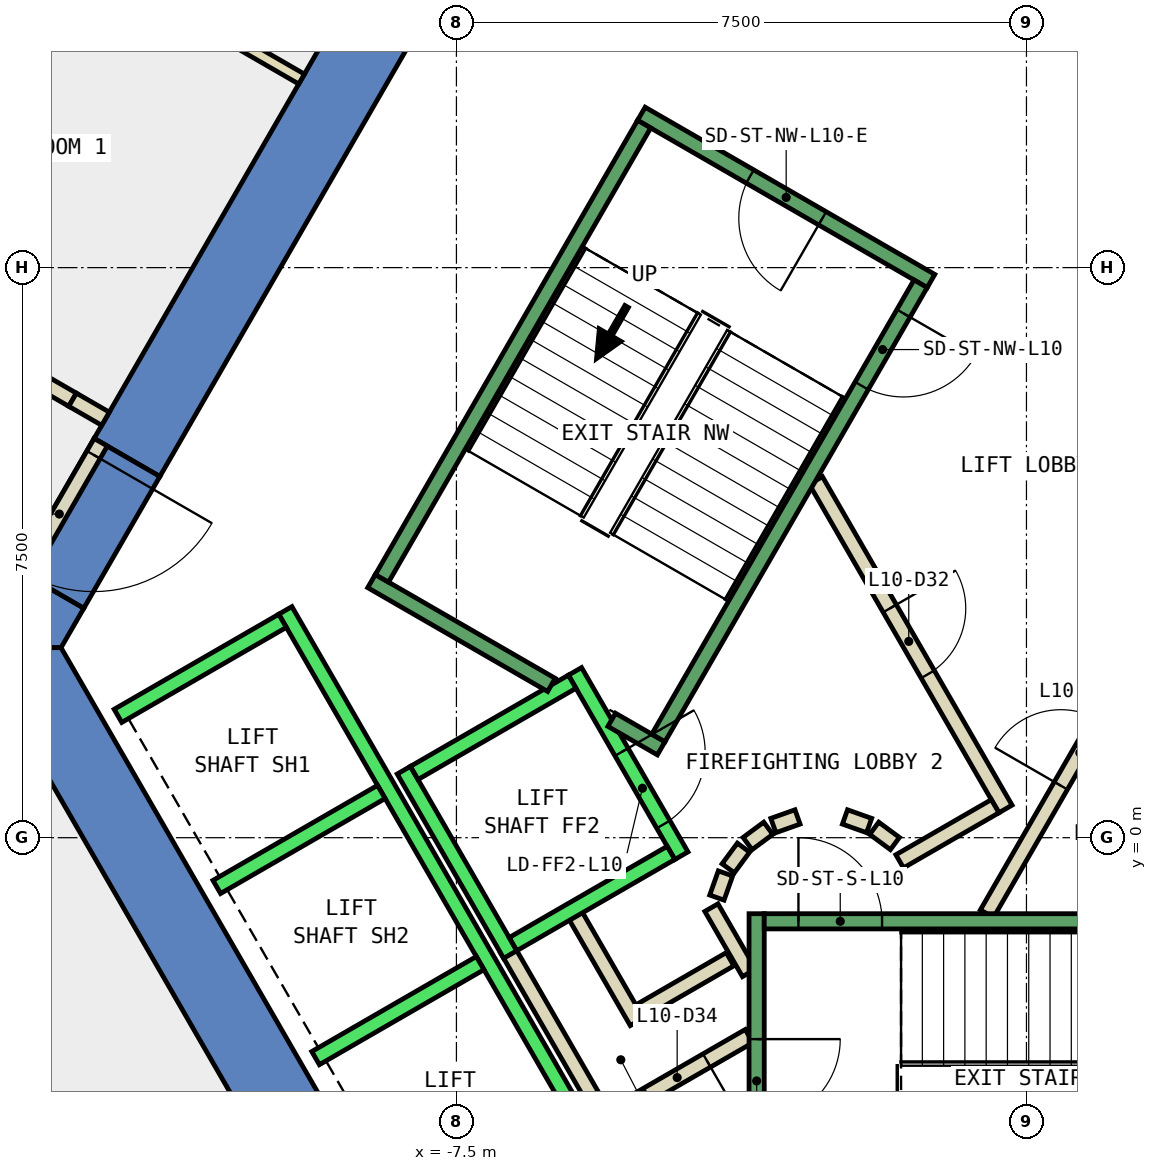
"""IFC4 building model, lengths in metres.
Left out: names, types, materials, properties, quantities, classifications, styles, units other than length and angle.
Written with IfcOpenShell. Run it as: python <this file> out.ifc"""

import sys

from ifc_helpers import new_model, si_unit, direction, frame, frame_2d, origin, place, context, subcontext, project, spatial, polyline, rectangle, outline, extrude, element, fill, save


model = new_model("IFC4")
c1 = context("Model", 3, precision=1e-05, world=origin(), true_north=direction((0.0, 1.0)))
c2 = subcontext(c1, "Body", "Model", "MODEL_VIEW")
j1 = project(units=[si_unit("LENGTHUNIT", "METRE"), si_unit("PLANEANGLEUNIT", "RADIAN")], contexts=[c1])
p1 = place(None, origin())
s1 = spatial("IfcSite", under=j1, at=p1, CompositionType="ELEMENT")
p2 = place(p1, origin())
s2 = spatial("IfcBuilding", under=s1, at=p2, CompositionType="ELEMENT")
p3 = place(p2, frame((0.0, 0.0, 51.8)))
s3 = spatial("IfcBuildingStorey", under=s2, at=p3, CompositionType="ELEMENT", Elevation=51.8)
p4 = place(p3, frame((0.0, 0.0, -0.4)))
e1 = element("IfcWall", 1, at=p4, inside=s3, PredefinedType="SHEAR", context=c2, shape_type="SweptSolid", body=[
    extrude(outline(polyline([(-12.267, 5.252), (-11.402, 4.752), (-6.351, 13.5), (-6.928, 14.5), (-12.267, 5.252)])), origin(), (0.0, 0.0, 1.0), 4.2),
])
p5 = place(p3, frame((0.0, 0.0, -0.4)))
e2 = element("IfcWall", 2, at=p5, inside=s3, PredefinedType="SHEAR", context=c2, shape_type="SweptSolid", body=[
    extrude(outline(polyline([(-12.402, 3.02), (-13.267, 3.52), (-13.856, 2.5), (-12.702, 2.5), (-12.402, 3.02)])), origin(), (0.0, 0.0, 1.0), 4.2),
])
p6 = place(p3, frame((0.0, 0.0, 3.6)))
e3 = element("IfcWall", 3, at=p6, inside=s3, PredefinedType="SHEAR", context=c2, shape_type="SweptSolid", body=[
    extrude(outline(polyline([(-13.267, 3.52), (-12.402, 3.02), (-11.402, 4.752), (-12.267, 5.252), (-13.267, 3.52)])), origin(), (0.0, 0.0, 1.0), 0.2),
])
p7 = place(p3, frame((0.0, 0.0, -0.4)))
e4 = element("IfcWall", 4, at=p7, inside=s3, PredefinedType="SHEAR", context=c2, shape_type="SweptSolid", body=[
    extrude(outline(polyline([(-13.856, 2.5), (-6.928, -9.5), (-6.351, -8.5), (-12.702, 2.5), (-13.856, 2.5)])), origin(), (0.0, 0.0, 1.0), 4.2),
])
p8 = place(p3, frame((-16.96, 8.308, 0.0), z_axis=(0.0, 0.0, 1.0), x_axis=(0.866018717003, -0.500011581666, 0.0)))
e5 = element("IfcWall", 5, at=p8, inside=s3, PredefinedType="PARTITIONING", context=c2, shape_type="SweptSolid", body=[
    extrude(rectangle(XDim=5.092, YDim=0.2, at=frame_2d((2.546, 0.0))), origin(), (0.0, 0.0, 1.0), 3.8),
])
p9 = place(p8, frame((2.296, 0.0, 0.0)))
e6 = element("IfcOpeningElement", 6, at=p9, cuts=e5, PredefinedType="OPENING", context=c2, shape_type="SweptSolid", body=[
    extrude(rectangle(XDim=1.0, YDim=2.1, at=frame_2d((0.5, 1.05))), frame((0.0, 0.11, 0.0), z_axis=(0.0, -1.0, 0.0), x_axis=(1.0, 0.0, 0.0)), (0.0, 0.0, 1.0), 0.22),
])
p10 = place(p3, frame((-3.9, -1.599, 0.0), z_axis=(0.0, 0.0, 1.0), x_axis=(-0.865969445389, -0.500096910261, 0.0)))
e7 = element("IfcWall", 7, at=p10, inside=s3, PredefinedType="PARTITIONING", context=c2, shape_type="SweptSolid", body=[
    extrude(rectangle(XDim=1.373, YDim=0.2, at=frame_2d((0.687, 0.0))), origin(), (0.0, 0.0, 1.0), 3.8),
])
p11 = place(p3, frame((-5.126, -2.422, 0.0), z_axis=(0.0, 0.0, 1.0), x_axis=(-0.500062241894, 0.865989465428, 0.0)))
e8 = element("IfcWall", 8, at=p11, inside=s3, PredefinedType="PARTITIONING", context=c2, shape_type="SweptSolid", body=[
    extrude(rectangle(XDim=1.7, YDim=0.2, at=frame_2d((0.85, 0.0))), origin(), (0.0, 0.0, 1.0), 3.8),
])
p12 = place(p3, frame((-3.65, -2.61, 0.0), z_axis=(0.0, 0.0, 1.0), x_axis=(-0.866072462134, -0.499918483688, 0.0)))
e9 = element("IfcWall", 9, at=p12, inside=s3, PredefinedType="PARTITIONING", context=c2, shape_type="SweptSolid", body=[
    extrude(rectangle(XDim=2.084, YDim=0.2, at=frame_2d((1.042, 0.0))), origin(), (0.0, 0.0, 1.0), 3.8),
])
p13 = place(p12, frame((0.642, 0.0, 0.0)))
e10 = element("IfcOpeningElement", 10, at=p13, cuts=e9, PredefinedType="OPENING", context=c2, shape_type="SweptSolid", body=[
    extrude(rectangle(XDim=0.9, YDim=2.1, at=frame_2d((0.45, 1.05))), frame((0.0, 0.11, 0.0), z_axis=(0.0, -1.0, 0.0), x_axis=(1.0, 0.0, 0.0)), (0.0, 0.0, 1.0), 0.22),
])
p14 = place(p3, frame((-5.492, -3.788, 0.0), z_axis=(0.0, 0.0, 1.0), x_axis=(-0.500008949224, 0.866020236886, 0.0)))
e11 = element("IfcWall", 11, at=p14, inside=s3, PredefinedType="PARTITIONING", context=c2, shape_type="SweptSolid", body=[
    extrude(rectangle(XDim=2.68, YDim=0.2, at=frame_2d((1.34, 0.0))), origin(), (0.0, 0.0, 1.0), 3.8),
])
p15 = place(p3, frame((-4.145, -0.92, 0.0), z_axis=(0.0, 0.0, 1.0), x_axis=(0.499743786207, -0.866173278362, 0.0)))
e12 = element("IfcWall", 12, at=p15, inside=s3, PredefinedType="PARTITIONING", context=c2, shape_type="SweptSolid", body=[
    extrude(rectangle(XDim=0.991, YDim=0.2, at=frame_2d((0.495, 0.0))), origin(), (0.0, 0.0, 1.0), 3.8),
])
p16 = place(p3, frame((-14.377, 12.775, 0.0), z_axis=(0.0, 0.0, 1.0), x_axis=(0.866051730117, -0.499954398681, 0.0)))
e13 = element("IfcWall", 13, at=p16, inside=s3, PredefinedType="PARTITIONING", context=c2, shape_type="SweptSolid", body=[
    extrude(rectangle(XDim=5.588, YDim=0.15, at=frame_2d((2.794, 0.0))), origin(), (0.0, 0.0, 1.0), 3.8),
])
p17 = place(p3, frame((-0.52, -1.0, 0.0), z_axis=(0.0, 0.0, 1.0), x_axis=(0.50011622646, 0.865958290007, 0.0)))
e14 = element("IfcWall", 14, at=p17, inside=s3, PredefinedType="PARTITIONING", context=c2, shape_type="SweptSolid", body=[
    extrude(rectangle(XDim=4.991, YDim=0.2, at=frame_2d((2.496, 0.0))), origin(), (0.0, 0.0, 1.0), 3.8),
])
p18 = place(p17, frame((1.945, 0.0, 0.0)))
e15 = element("IfcOpeningElement", 15, at=p18, cuts=e14, PredefinedType="OPENING", context=c2, shape_type="SweptSolid", body=[
    extrude(rectangle(XDim=1.0, YDim=2.1, at=frame_2d((0.5, 1.05))), frame((0.0, 0.11, 0.0), z_axis=(0.0, -1.0, 0.0), x_axis=(1.0, 0.0, 0.0)), (0.0, 0.0, 1.0), 0.22),
])
p19 = place(p3, frame((-2.771, 4.7, 0.0), z_axis=(0.0, 0.0, 1.0), x_axis=(0.499969479948, -0.866043023828, 0.0)))
e16 = element("IfcWall", 16, at=p19, inside=s3, PredefinedType="PARTITIONING", context=c2, shape_type="SweptSolid", body=[
    extrude(rectangle(XDim=4.99, YDim=0.2, at=frame_2d((2.495, 0.0))), origin(), (0.0, 0.0, 1.0), 3.8),
])
p20 = place(p19, frame((1.945, 0.0, 0.0)))
e17 = element("IfcOpeningElement", 17, at=p20, cuts=e16, PredefinedType="OPENING", context=c2, shape_type="SweptSolid", body=[
    extrude(rectangle(XDim=1.0, YDim=2.1, at=frame_2d((0.5, 1.05))), frame((0.0, 0.11, 0.0), z_axis=(0.0, -1.0, 0.0), x_axis=(1.0, 0.0, 0.0)), (0.0, 0.0, 1.0), 0.22),
])
p21 = place(p3, frame((-0.412, 0.414, 0.0), z_axis=(0.0, 0.0, 1.0), x_axis=(-0.866017369001, -0.500013916395, 0.0)))
e18 = element("IfcWall", 18, at=p21, inside=s3, PredefinedType="PARTITIONING", context=c2, shape_type="SweptSolid", body=[
    extrude(rectangle(XDim=1.45, YDim=0.2, at=frame_2d((0.725, 0.0))), origin(), (0.0, 0.0, 1.0), 3.8),
])
p22 = place(p3, frame((-1.731, -0.077, 0.0), z_axis=(0.0, 0.0, 1.0), x_axis=(-0.804311165252, 0.594208338422, 0.0)))
e19 = element("IfcWall", 19, at=p22, inside=s3, PredefinedType="PARTITIONING", context=c2, shape_type="SweptSolid", body=[
    extrude(rectangle(XDim=0.338, YDim=0.2, at=frame_2d((0.169, 0.0))), origin(), (0.0, 0.0, 1.0), 3.8),
])
p23 = place(p3, frame((-2.07, 0.16, 0.0), z_axis=(0.0, 0.0, 1.0), x_axis=(-0.942199461132, 0.335052496547, 0.0)))
e20 = element("IfcWall", 20, at=p23, inside=s3, PredefinedType="PARTITIONING", context=c2, shape_type="SweptSolid", body=[
    extrude(rectangle(XDim=0.337, YDim=0.2, at=frame_2d((0.169, 0.0))), origin(), (0.0, 0.0, 1.0), 3.8),
])
p24 = place(p3, frame((-3.012, 0.273, 0.0), z_axis=(0.0, 0.0, 1.0), x_axis=(-0.942280615813, -0.334824194261, 0.0)))
e21 = element("IfcWall", 21, at=p24, inside=s3, PredefinedType="PARTITIONING", context=c2, shape_type="SweptSolid", body=[
    extrude(rectangle(XDim=0.338, YDim=0.2, at=frame_2d((0.169, 0.0))), origin(), (0.0, 0.0, 1.0), 3.8),
])
p25 = place(p3, frame((-3.397, 0.124, 0.0), z_axis=(0.0, 0.0, 1.0), x_axis=(-0.804311165252, -0.594208338422, 0.0)))
e22 = element("IfcWall", 22, at=p25, inside=s3, PredefinedType="PARTITIONING", context=c2, shape_type="SweptSolid", body=[
    extrude(rectangle(XDim=0.338, YDim=0.2, at=frame_2d((0.169, 0.0))), origin(), (0.0, 0.0, 1.0), 3.8),
])
p26 = place(p3, frame((-3.723, -0.131, 0.0), z_axis=(0.0, 0.0, 1.0), x_axis=(-0.594675113454, -0.803966112121, 0.0)))
e23 = element("IfcWall", 23, at=p26, inside=s3, PredefinedType="PARTITIONING", context=c2, shape_type="SweptSolid", body=[
    extrude(rectangle(XDim=0.338, YDim=0.2, at=frame_2d((0.169, 0.0))), origin(), (0.0, 0.0, 1.0), 3.8),
])
p27 = place(p3, frame((-3.96, -0.47, 0.0), z_axis=(0.0, 0.0, 1.0), x_axis=(-0.334824194261, -0.942280615813, 0.0)))
e24 = element("IfcWall", 24, at=p27, inside=s3, PredefinedType="PARTITIONING", context=c2, shape_type="SweptSolid", body=[
    extrude(rectangle(XDim=0.338, YDim=0.2, at=frame_2d((0.169, 0.0))), origin(), (0.0, 0.0, 1.0), 3.8),
])
p28 = place(p3, frame((-12.18, 5.202, 0.0), z_axis=(0.0, 0.0, 1.0), x_axis=(-0.50002537861, -0.866010750942, 0.0)))
e25 = element("IfcWall", 25, at=p28, inside=s3, PredefinedType="PARTITIONING", context=c2, shape_type="SweptSolid", body=[
    extrude(rectangle(XDim=2.0, YDim=0.2, at=frame_2d((1.0, 0.0))), origin(), (0.0, 0.0, 1.0), 2.4),
])
p29 = place(p28, frame((0.19, 0.0, 0.0)))
e26 = element("IfcOpeningElement", 26, at=p29, cuts=e25, PredefinedType="OPENING", context=c2, shape_type="SweptSolid", body=[
    extrude(rectangle(XDim=1.8, YDim=2.1, at=frame_2d((0.9, 1.05))), frame((0.0, 0.11, 0.0), z_axis=(0.0, -1.0, 0.0), x_axis=(1.0, 0.0, 0.0)), (0.0, 0.0, 1.0), 0.22),
])
p30 = place(p3, frame((-12.55, 5.762, 0.0), z_axis=(0.0, 0.0, 1.0), x_axis=(0.866071776036, -0.499919672301, 0.0)))
e27 = element("IfcWall", 27, at=p30, inside=s3, PredefinedType="PARTITIONING", context=c2, shape_type="SweptSolid", body=[
    extrude(rectangle(XDim=0.5, YDim=0.2, at=frame_2d((0.25, 0.0))), origin(), (0.0, 0.0, 1.0), 2.4),
])
p31 = place(p3, frame((-5.94, 2.188, 0.0), z_axis=(0.0, 0.0, 1.0), x_axis=(0.49994636267, -0.866056369097, 0.0)))
e28 = element("IfcWall", 28, at=p31, inside=s3, PredefinedType="STANDARD", context=c2, shape_type="SweptSolid", body=[
    extrude(rectangle(XDim=2.8, YDim=0.2, at=frame_2d((1.4, 0.0))), origin(), (0.0, 0.0, 1.0), 3.8),
])
p32 = place(p31, frame((1.225, 0.0, 0.0)))
e29 = element("IfcOpeningElement", 29, at=p32, cuts=e28, PredefinedType="OPENING", context=c2, shape_type="SweptSolid", body=[
    extrude(rectangle(XDim=1.1, YDim=2.1, at=frame_2d((0.55, 1.05))), frame((0.0, 0.11, 0.0), z_axis=(0.0, -1.0, 0.0), x_axis=(1.0, 0.0, 0.0)), (0.0, 0.0, 1.0), 0.22),
])
p33 = place(p3, frame((-8.192, 0.888, 0.0), z_axis=(0.0, 0.0, 1.0), x_axis=(0.49994636267, -0.866056369097, 0.0)))
e30 = element("IfcWall", 30, at=p33, inside=s3, PredefinedType="STANDARD", context=c2, shape_type="SweptSolid", body=[
    extrude(rectangle(XDim=2.8, YDim=0.2, at=frame_2d((1.4, 0.0))), origin(), (0.0, 0.0, 1.0), 3.8),
])
for number, where, z_axis, x_axis in (
    (31, (-5.977, 2.052, 0.0), (0.0, 0.0, 1.0), (-0.866, -0.5, 0.0)),
    (32, (-4.677, -0.2, 0.0), (0.0, 0.0, 1.0), (-0.866, -0.5, 0.0)),
):
    element("IfcWall", number, at=place(p3, frame(where, z_axis=z_axis, x_axis=x_axis)), inside=s3, PredefinedType="STANDARD", context=c2, shape_type="SweptSolid", body=[
        extrude(rectangle(XDim=2.399, YDim=0.2, at=frame_2d((1.2, 0.0))), origin(), (0.0, 0.0, 1.0), 3.8),
    ])
p34 = place(p3, frame((-9.751, 2.99, 0.0), z_axis=(0.0, 0.0, 1.0), x_axis=(0.50000090737, -0.866024879913, 0.0)))
e33 = element("IfcWall", 33, at=p34, inside=s3, PredefinedType="STANDARD", context=c2, shape_type="SweptSolid", body=[
    extrude(rectangle(XDim=10.6, YDim=0.2, at=frame_2d((5.3, 0.0))), origin(), (0.0, 0.0, 1.0), 3.8),
])
p35 = place(p3, frame((-9.788, 2.853, 0.0), z_axis=(0.0, 0.0, 1.0), x_axis=(-0.865998541277, -0.500046524342, 0.0)))
e34 = element("IfcWall", 34, at=p35, inside=s3, PredefinedType="STANDARD", context=c2, shape_type="SweptSolid", body=[
    extrude(rectangle(XDim=2.5, YDim=0.2, at=frame_2d((1.25, 0.0))), origin(), (0.0, 0.0, 1.0), 3.8),
])
for number, where, z_axis, x_axis in (
    (35, (-8.488, 0.602, 0.0), (0.0, 0.0, 1.0), (-0.866, -0.5, 0.0)),
    (36, (-7.188, -1.65, 0.0), (0.0, 0.0, 1.0), (-0.866, -0.5, 0.0)),
):
    element("IfcWall", number, at=place(p3, frame(where, z_axis=z_axis, x_axis=x_axis)), inside=s3, PredefinedType="STANDARD", context=c2, shape_type="SweptSolid", body=[
        extrude(rectangle(XDim=2.5, YDim=0.2, at=frame_2d((1.25, 0.0))), origin(), (0.0, 0.0, 1.0), 3.8),
    ])
p36 = place(p3, frame((-3.55, -1.0, 0.0), z_axis=(0.0, 0.0, 1.0), x_axis=(0.0, -1.0, 0.0)))
e37 = element("IfcWall", 37, at=p36, inside=s3, PredefinedType="STANDARD", context=c2, shape_type="SweptSolid", body=[
    extrude(rectangle(XDim=4.4, YDim=0.2, at=frame_2d((2.2, 0.0))), origin(), (0.0, 0.0, 1.0), 3.8),
])
p37 = place(p36, frame((1.65, 0.0, 0.0)))
e38 = element("IfcOpeningElement", 38, at=p37, cuts=e37, PredefinedType="OPENING", context=c2, shape_type="SweptSolid", body=[
    extrude(rectangle(XDim=1.1, YDim=2.2, at=frame_2d((0.55, 1.1))), frame((0.0, 0.11, 0.0), z_axis=(0.0, -1.0, 0.0), x_axis=(1.0, 0.0, 0.0)), (0.0, 0.0, 1.0), 0.22),
])
p38 = place(p3, frame((-3.45, -1.1, 0.0), z_axis=(0.0, 0.0, 1.0), x_axis=(1.0, 0.0, 0.0)))
e39 = element("IfcWall", 39, at=p38, inside=s3, PredefinedType="STANDARD", context=c2, shape_type="SweptSolid", body=[
    extrude(rectangle(XDim=6.9, YDim=0.2, at=frame_2d((3.45, 0.0))), origin(), (0.0, 0.0, 1.0), 3.8),
])
p39 = place(p38, frame((0.45, 0.0, 0.0)))
e40 = element("IfcOpeningElement", 40, at=p39, cuts=e39, PredefinedType="OPENING", context=c2, shape_type="SweptSolid", body=[
    extrude(rectangle(XDim=1.1, YDim=2.2, at=frame_2d((0.55, 1.1))), frame((0.0, 0.11, 0.0), z_axis=(0.0, -1.0, 0.0), x_axis=(1.0, 0.0, 0.0)), (0.0, 0.0, 1.0), 0.22),
])
p40 = place(p3, frame((-1.256, 7.324, 0.0), z_axis=(0.0, 0.0, 1.0), x_axis=(-0.866046073146, 0.499964197906, 0.0)))
e41 = element("IfcWall", 41, at=p40, inside=s3, PredefinedType="STANDARD", context=c2, shape_type="SweptSolid", body=[
    extrude(rectangle(XDim=4.4, YDim=0.2, at=frame_2d((2.2, 0.0))), origin(), (0.0, 0.0, 1.0), 3.8),
])
p41 = place(p40, frame((1.65, 0.0, 0.0)))
e42 = element("IfcOpeningElement", 42, at=p41, cuts=e41, PredefinedType="OPENING", context=c2, shape_type="SweptSolid", body=[
    extrude(rectangle(XDim=1.1, YDim=2.2, at=frame_2d((0.55, 1.1))), frame((0.0, 0.11, 0.0), z_axis=(0.0, -1.0, 0.0), x_axis=(1.0, 0.0, 0.0)), (0.0, 0.0, 1.0), 0.22),
])
p42 = place(p3, frame((-6.25, 2.01, 0.0), z_axis=(0.0, 0.0, 1.0), x_axis=(-0.86611865017, 0.499838457731, 0.0)))
e43 = element("IfcWall", 43, at=p42, inside=s3, PredefinedType="STANDARD", context=c2, shape_type="SweptSolid", body=[
    extrude(rectangle(XDim=2.733, YDim=0.2, at=frame_2d((1.366, 0.0))), origin(), (0.0, 0.0, 1.0), 3.8),
])
p43 = place(p3, frame((-4.806, 1.176, 0.0), z_axis=(0.0, 0.0, 1.0), x_axis=(-0.866558586415, 0.499075361355, 0.0)))
e44 = element("IfcWall", 44, at=p43, inside=s3, PredefinedType="STANDARD", context=c2, shape_type="SweptSolid", body=[
    extrude(rectangle(XDim=0.751, YDim=0.2, at=frame_2d((0.376, 0.0))), origin(), (0.0, 0.0, 1.0), 3.8),
])
p44 = place(p3, frame((-1.393, 7.288, 0.0), z_axis=(0.0, 0.0, 1.0), x_axis=(-0.499963383562, -0.866046543262, 0.0)))
e45 = element("IfcWall", 45, at=p44, inside=s3, PredefinedType="STANDARD", context=c2, shape_type="SweptSolid", body=[
    extrude(rectangle(XDim=6.9, YDim=0.2, at=frame_2d((3.45, 0.0))), origin(), (0.0, 0.0, 1.0), 3.8),
])
p45 = place(p44, frame((0.45, 0.0, 0.0)))
e46 = element("IfcOpeningElement", 46, at=p45, cuts=e45, PredefinedType="OPENING", context=c2, shape_type="SweptSolid", body=[
    extrude(rectangle(XDim=1.1, YDim=2.2, at=frame_2d((0.55, 1.1))), frame((0.0, 0.11, 0.0), z_axis=(0.0, -1.0, 0.0), x_axis=(1.0, 0.0, 0.0)), (0.0, 0.0, 1.0), 0.22),
])
p46 = place(p3, frame((-5.03, 9.388, 0.0), z_axis=(0.0, 0.0, 1.0), x_axis=(-0.499978703459, -0.866037698999, 0.0)))
e47 = element("IfcWall", 47, at=p46, inside=s3, PredefinedType="STANDARD", context=c2, shape_type="SweptSolid", body=[
    extrude(rectangle(XDim=6.9, YDim=0.2, at=frame_2d((3.45, 0.0))), origin(), (0.0, 0.0, 1.0), 3.8),
])
p47 = place(p18, origin())
e48 = element("IfcDoor", 48, at=p47, inside=s3, OperationType="SINGLE_SWING_LEFT", PredefinedType="DOOR", context=c2, shape_type="SweptSolid", body=[
    extrude(rectangle(XDim=1.0, YDim=2.1, at=frame_2d((0.5, 1.05))), frame((0.0, 0.025, 0.0), z_axis=(0.0, -1.0, 0.0), x_axis=(1.0, 0.0, 0.0)), (0.0, 0.0, 1.0), 0.05),
])
fill(e15, e48)
p48 = place(p20, origin())
e49 = element("IfcDoor", 49, at=p48, inside=s3, OperationType="SINGLE_SWING_RIGHT", PredefinedType="DOOR", context=c2, shape_type="SweptSolid", body=[
    extrude(rectangle(XDim=1.0, YDim=2.1, at=frame_2d((0.5, 1.05))), frame((0.0, 0.025, 0.0), z_axis=(0.0, -1.0, 0.0), x_axis=(1.0, 0.0, 0.0)), (0.0, 0.0, 1.0), 0.05),
])
fill(e17, e49)
p49 = place(p13, origin())
e50 = element("IfcDoor", 50, at=p49, inside=s3, OperationType="SINGLE_SWING_LEFT", PredefinedType="DOOR", context=c2, shape_type="SweptSolid", body=[
    extrude(rectangle(XDim=0.9, YDim=2.1, at=frame_2d((0.45, 1.05))), frame((0.0, 0.025, 0.0), z_axis=(0.0, -1.0, 0.0), x_axis=(1.0, 0.0, 0.0)), (0.0, 0.0, 1.0), 0.05),
])
fill(e10, e50)
p50 = place(p29, origin())
e51 = element("IfcDoor", 51, at=p50, inside=s3, OperationType="DOUBLE_DOOR_SINGLE_SWING", PredefinedType="DOOR", context=c2, shape_type="SweptSolid", body=[
    extrude(rectangle(XDim=1.8, YDim=2.1, at=frame_2d((0.9, 1.05))), frame((0.0, 0.025, 0.0), z_axis=(0.0, -1.0, 0.0), x_axis=(1.0, 0.0, 0.0)), (0.0, 0.0, 1.0), 0.05),
])
fill(e26, e51)
p51 = place(p32, origin())
e52 = element("IfcDoor", 52, at=p51, inside=s3, OperationType="SLIDING_TO_LEFT", PredefinedType="DOOR", context=c2, shape_type="SweptSolid", body=[
    extrude(rectangle(XDim=1.1, YDim=2.1, at=frame_2d((0.55, 1.05))), frame((0.0, 0.025, 0.0), z_axis=(0.0, -1.0, 0.0), x_axis=(1.0, 0.0, 0.0)), (0.0, 0.0, 1.0), 0.05),
])
fill(e29, e52)
p52 = place(p39, origin())
e53 = element("IfcDoor", 53, at=p52, inside=s3, OperationType="SINGLE_SWING_LEFT", PredefinedType="DOOR", context=c2, shape_type="SweptSolid", body=[
    extrude(rectangle(XDim=1.1, YDim=2.2, at=frame_2d((0.55, 1.1))), frame((0.0, 0.025, 0.0), z_axis=(0.0, -1.0, 0.0), x_axis=(1.0, 0.0, 0.0)), (0.0, 0.0, 1.0), 0.05),
])
fill(e40, e53)
p53 = place(p37, origin())
e54 = element("IfcDoor", 54, at=p53, inside=s3, OperationType="SINGLE_SWING_LEFT", PredefinedType="DOOR", context=c2, shape_type="SweptSolid", body=[
    extrude(rectangle(XDim=1.1, YDim=2.2, at=frame_2d((0.55, 1.1))), frame((0.0, 0.025, 0.0), z_axis=(0.0, -1.0, 0.0), x_axis=(1.0, 0.0, 0.0)), (0.0, 0.0, 1.0), 0.05),
])
fill(e38, e54)
p54 = place(p45, origin())
e55 = element("IfcDoor", 55, at=p54, inside=s3, OperationType="SINGLE_SWING_LEFT", PredefinedType="DOOR", context=c2, shape_type="SweptSolid", body=[
    extrude(rectangle(XDim=1.1, YDim=2.2, at=frame_2d((0.55, 1.1))), frame((0.0, 0.025, 0.0), z_axis=(0.0, -1.0, 0.0), x_axis=(1.0, 0.0, 0.0)), (0.0, 0.0, 1.0), 0.05),
])
fill(e46, e55)
p55 = place(p41, origin())
e56 = element("IfcDoor", 56, at=p55, inside=s3, OperationType="SINGLE_SWING_LEFT", PredefinedType="DOOR", context=c2, shape_type="SweptSolid", body=[
    extrude(rectangle(XDim=1.1, YDim=2.2, at=frame_2d((0.55, 1.1))), frame((0.0, 0.025, 0.0), z_axis=(0.0, -1.0, 0.0), x_axis=(1.0, 0.0, 0.0)), (0.0, 0.0, 1.0), 0.05),
])
fill(e42, e56)
save(model, sys.argv[1])
